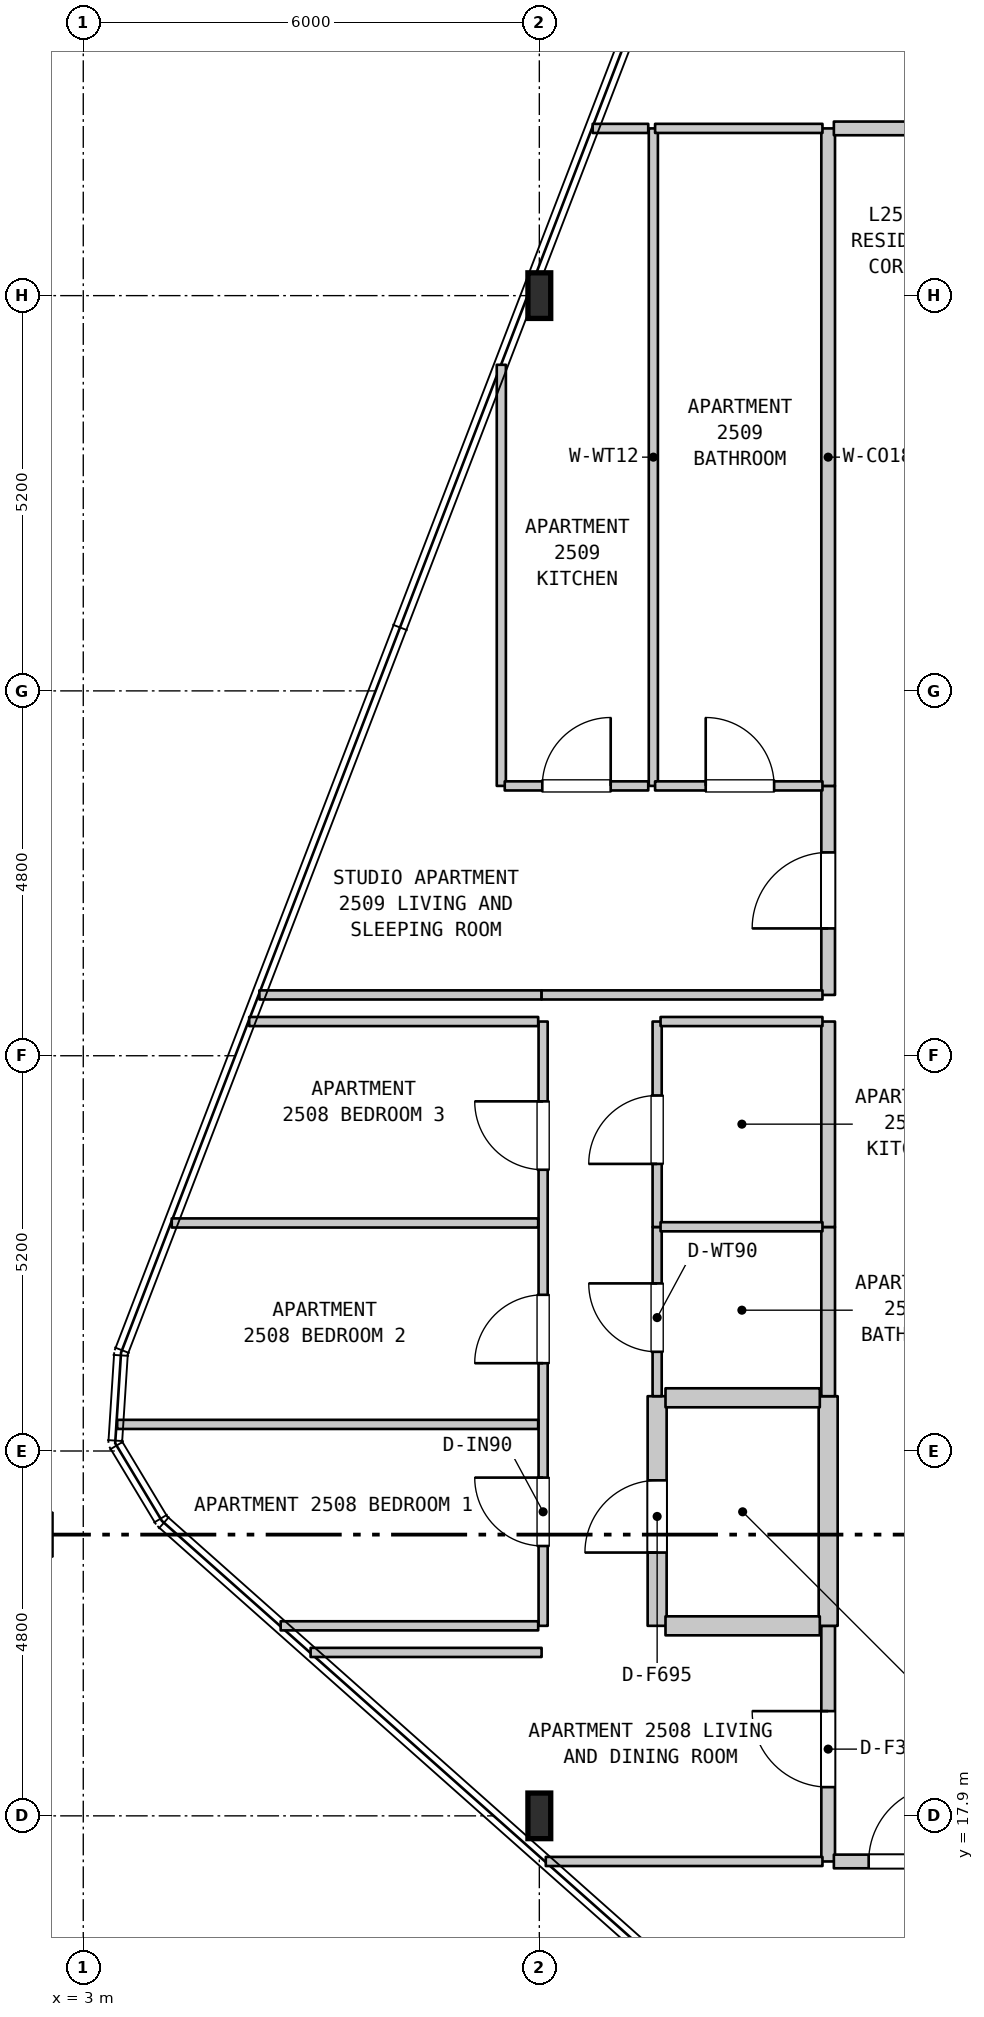
"""IFC4 building model, lengths in metres.
Left out: names, types, materials, properties, quantities, classifications, styles, units other than length and angle.
Written with IfcOpenShell. Run it as: python <this file> out.ifc"""

import sys

from ifc_helpers import new_model, si_unit, direction, frame, frame_2d, origin, origin_2d, place, context, subcontext, project, spatial, rectangle, i_section, extrude, element, fill, save


model = new_model("IFC4")
c1 = context("Model", 3, precision=1e-05, world=origin(), true_north=direction((0.0, 1.0)))
c2 = subcontext(c1, "Body", "Model", "MODEL_VIEW")
j1 = project(units=[si_unit("LENGTHUNIT", "METRE"), si_unit("PLANEANGLEUNIT", "RADIAN")], contexts=[c1])
p1 = place(None, origin())
s1 = spatial("IfcSite", under=j1, at=p1, CompositionType="ELEMENT")
p2 = place(p1, origin())
s2 = spatial("IfcBuilding", under=s1, at=p2, CompositionType="ELEMENT")
p3 = place(p2, frame((0.0, 0.0, 105.7)))
s3 = spatial("IfcBuildingStorey", under=s2, at=p3, CompositionType="ELEMENT", Elevation=105.7)
for number, where, z_axis, x_axis in (
    (1, (9.0, 17.9, 0.0), (0.0, 0.0, 1.0), (1.0, 0.0, 0.0)),
    (2, (9.0, 37.9, 0.0), (0.0, 0.0, 1.0), (1.0, 0.0, 0.0)),
):
    element("IfcColumn", number, at=place(p3, frame(where, z_axis=z_axis, x_axis=x_axis)), inside=s3, PredefinedType="COLUMN", context=c2, shape_type="SweptSolid", body=[
        extrude(i_section(OverallWidth=0.3, OverallDepth=0.6, WebThickness=0.015, FlangeThickness=0.03, FilletRadius=0.027, at=origin_2d()), origin(), (0.0, 0.0, 1.0), 3.7),
    ])
p4 = place(p3, frame((8.5, 31.45, 0.0), z_axis=(0.0, 0.0, 1.0), x_axis=(0.0, 1.0, 0.0)))
e3 = element("IfcWall", 3, at=p4, inside=s3, PredefinedType="PARTITIONING", context=c2, shape_type="SweptSolid", body=[
    extrude(rectangle(XDim=5.54, YDim=0.12, at=frame_2d((2.77, 0.0))), origin(), (0.0, 0.0, 1.0), 3.385),
])
p5 = place(p3, frame((9.05, 20.4, 0.0), z_axis=(0.0, 0.0, 1.0), x_axis=(0.0, 1.0, 0.0)))
e4 = element("IfcWall", 4, at=p5, inside=s3, PredefinedType="PARTITIONING", context=c2, shape_type="SweptSolid", body=[
    extrude(rectangle(XDim=7.95, YDim=0.12, at=frame_2d((3.975, 0.0))), origin(), (0.0, 0.0, 1.0), 2.785),
])
p6 = place(p5, frame((1.05, 0.0, 0.0)))
e5 = element("IfcOpeningElement", 5, at=p6, cuts=e4, PredefinedType="OPENING", context=c2, shape_type="SweptSolid", body=[
    extrude(rectangle(XDim=0.9, YDim=2.15, at=frame_2d((0.45, 1.075))), frame((0.0, 0.07, 0.0), z_axis=(0.0, -1.0, 0.0), x_axis=(1.0, 0.0, 0.0)), (0.0, 0.0, 1.0), 0.14),
])
p7 = place(p5, frame((3.455, 0.0, 0.0)))
e6 = element("IfcOpeningElement", 6, at=p7, cuts=e4, PredefinedType="OPENING", context=c2, shape_type="SweptSolid", body=[
    extrude(rectangle(XDim=0.9, YDim=2.15, at=frame_2d((0.45, 1.075))), frame((0.0, 0.07, 0.0), z_axis=(0.0, -1.0, 0.0), x_axis=(1.0, 0.0, 0.0)), (0.0, 0.0, 1.0), 0.14),
])
p8 = place(p5, frame((6.0, 0.0, 0.0)))
e7 = element("IfcOpeningElement", 7, at=p8, cuts=e4, PredefinedType="OPENING", context=c2, shape_type="SweptSolid", body=[
    extrude(rectangle(XDim=0.9, YDim=2.15, at=frame_2d((0.45, 1.075))), frame((0.0, 0.07, 0.0), z_axis=(0.0, -1.0, 0.0), x_axis=(1.0, 0.0, 0.0)), (0.0, 0.0, 1.0), 0.14),
])
p9 = place(p3, frame((10.5, 31.45, 0.0), z_axis=(0.0, 0.0, 1.0), x_axis=(0.0, 1.0, 0.0)))
e8 = element("IfcWall", 8, at=p9, inside=s3, PredefinedType="PARTITIONING", context=c2, shape_type="SweptSolid", body=[
    extrude(rectangle(XDim=8.65, YDim=0.12, at=frame_2d((4.325, 0.0))), origin(), (0.0, 0.0, 1.0), 3.385),
])
p10 = place(p3, frame((10.55, 20.4, 0.0), z_axis=(0.0, 0.0, 1.0), x_axis=(0.0, 1.0, 0.0)))
e9 = element("IfcWall", 9, at=p10, inside=s3, PredefinedType="STANDARD", context=c2, shape_type="SweptSolid", body=[
    extrude(rectangle(XDim=3.021, YDim=0.25, at=frame_2d((1.51, 0.0))), origin(), (0.0, 0.0, 1.0), 3.385),
])
p11 = place(p10, frame((0.964, 0.0, 0.0)))
e10 = element("IfcOpeningElement", 10, at=p11, cuts=e9, PredefinedType="OPENING", context=c2, shape_type="SweptSolid", body=[
    extrude(rectangle(XDim=0.95, YDim=2.15, at=frame_2d((0.475, 1.075))), frame((0.0, 0.135, 0.0), z_axis=(0.0, -1.0, 0.0), x_axis=(1.0, 0.0, 0.0)), (0.0, 0.0, 1.0), 0.27),
])
p12 = place(p3, frame((10.55, 23.421, 0.0), z_axis=(0.0, 0.0, 1.0), x_axis=(0.0, 1.0, 0.0)))
e11 = element("IfcWall", 11, at=p12, inside=s3, PredefinedType="PARTITIONING", context=c2, shape_type="SweptSolid", body=[
    extrude(rectangle(XDim=2.226, YDim=0.12, at=frame_2d((1.113, 0.0))), origin(), (0.0, 0.0, 1.0), 3.385),
])
p13 = place(p12, frame((0.584, 0.0, 0.0)))
e12 = element("IfcOpeningElement", 12, at=p13, cuts=e11, PredefinedType="OPENING", context=c2, shape_type="SweptSolid", body=[
    extrude(rectangle(XDim=0.9, YDim=2.1, at=frame_2d((0.45, 1.05))), frame((0.0, 0.07, 0.0), z_axis=(0.0, -1.0, 0.0), x_axis=(1.0, 0.0, 0.0)), (0.0, 0.0, 1.0), 0.14),
])
p14 = place(p3, frame((10.55, 25.647, 0.0), z_axis=(0.0, 0.0, 1.0), x_axis=(0.0, 1.0, 0.0)))
e13 = element("IfcWall", 13, at=p14, inside=s3, PredefinedType="PARTITIONING", context=c2, shape_type="SweptSolid", body=[
    extrude(rectangle(XDim=2.703, YDim=0.12, at=frame_2d((1.352, 0.0))), origin(), (0.0, 0.0, 1.0), 3.385),
])
p15 = place(p14, frame((0.83, 0.0, 0.0)))
e14 = element("IfcOpeningElement", 14, at=p15, cuts=e13, PredefinedType="OPENING", context=c2, shape_type="SweptSolid", body=[
    extrude(rectangle(XDim=0.9, YDim=2.15, at=frame_2d((0.45, 1.075))), frame((0.0, 0.07, 0.0), z_axis=(0.0, -1.0, 0.0), x_axis=(1.0, 0.0, 0.0)), (0.0, 0.0, 1.0), 0.14),
])
p16 = place(p3, frame((12.8, 17.3, 0.0), z_axis=(0.0, 0.0, 1.0), x_axis=(0.0, 1.0, 0.0)))
e15 = element("IfcWall", 15, at=p16, inside=s3, PredefinedType="STANDARD", context=c2, shape_type="SweptSolid", body=[
    extrude(rectangle(XDim=3.1, YDim=0.18, at=frame_2d((1.55, 0.0))), origin(), (0.0, 0.0, 1.0), 3.385),
])
p17 = place(p16, frame((0.978, 0.0, 0.0)))
e16 = element("IfcOpeningElement", 16, at=p17, cuts=e15, PredefinedType="OPENING", context=c2, shape_type="SweptSolid", body=[
    extrude(rectangle(XDim=1.0, YDim=2.15, at=frame_2d((0.5, 1.075))), frame((0.0, 0.1, 0.0), z_axis=(0.0, -1.0, 0.0), x_axis=(1.0, 0.0, 0.0)), (0.0, 0.0, 1.0), 0.2),
])
p18 = place(p3, frame((12.8, 20.4, 0.0), z_axis=(0.0, 0.0, 1.0), x_axis=(0.0, 1.0, 0.0)))
e17 = element("IfcWall", 17, at=p18, inside=s3, PredefinedType="STANDARD", context=c2, shape_type="SweptSolid", body=[
    extrude(rectangle(XDim=3.021, YDim=0.25, at=frame_2d((1.51, 0.0))), origin(), (0.0, 0.0, 1.0), 3.385),
])
p19 = place(p3, frame((12.8, 23.421, 0.0), z_axis=(0.0, 0.0, 1.0), x_axis=(0.0, 1.0, 0.0)))
e18 = element("IfcWall", 18, at=p19, inside=s3, PredefinedType="STANDARD", context=c2, shape_type="SweptSolid", body=[
    extrude(rectangle(XDim=2.226, YDim=0.18, at=frame_2d((1.113, 0.0))), origin(), (0.0, 0.0, 1.0), 3.385),
])
p20 = place(p3, frame((12.8, 25.647, 0.0), z_axis=(0.0, 0.0, 1.0), x_axis=(0.0, 1.0, 0.0)))
e19 = element("IfcWall", 19, at=p20, inside=s3, PredefinedType="STANDARD", context=c2, shape_type="SweptSolid", body=[
    extrude(rectangle(XDim=2.703, YDim=0.18, at=frame_2d((1.352, 0.0))), origin(), (0.0, 0.0, 1.0), 3.385),
])
p21 = place(p3, frame((12.8, 28.7, 0.0), z_axis=(0.0, 0.0, 1.0), x_axis=(0.0, 1.0, 0.0)))
e20 = element("IfcWall", 20, at=p21, inside=s3, PredefinedType="STANDARD", context=c2, shape_type="SweptSolid", body=[
    extrude(rectangle(XDim=2.75, YDim=0.18, at=frame_2d((1.375, 0.0))), origin(), (0.0, 0.0, 1.0), 3.385),
])
p22 = place(p21, frame((0.875, 0.0, 0.0)))
e21 = element("IfcOpeningElement", 21, at=p22, cuts=e20, PredefinedType="OPENING", context=c2, shape_type="SweptSolid", body=[
    extrude(rectangle(XDim=1.0, YDim=2.15, at=frame_2d((0.5, 1.075))), frame((0.0, 0.1, 0.0), z_axis=(0.0, -1.0, 0.0), x_axis=(1.0, 0.0, 0.0)), (0.0, 0.0, 1.0), 0.2),
])
p23 = place(p3, frame((12.8, 31.45, 0.0), z_axis=(0.0, 0.0, 1.0), x_axis=(0.0, 1.0, 0.0)))
e22 = element("IfcWall", 22, at=p23, inside=s3, PredefinedType="STANDARD", context=c2, shape_type="SweptSolid", body=[
    extrude(rectangle(XDim=8.65, YDim=0.18, at=frame_2d((4.325, 0.0))), origin(), (0.0, 0.0, 1.0), 3.385),
])
p24 = place(p3, frame((9.085, 17.3, 0.0), z_axis=(0.0, 0.0, 1.0), x_axis=(1.0, 0.0, 0.0)))
e23 = element("IfcWall", 23, at=p24, inside=s3, PredefinedType="PARTITIONING", context=c2, shape_type="SweptSolid", body=[
    extrude(rectangle(XDim=3.64, YDim=0.12, at=frame_2d((1.82, 0.0))), origin(), (0.0, 0.0, 1.0), 3.385),
])
p25 = place(p3, frame((12.875, 17.3, 0.0), z_axis=(0.0, 0.0, 1.0), x_axis=(1.0, 0.0, 0.0)))
e24 = element("IfcWall", 24, at=p25, inside=s3, PredefinedType="STANDARD", context=c2, shape_type="SweptSolid", body=[
    extrude(rectangle(XDim=3.78, YDim=0.18, at=frame_2d((1.89, 0.0))), origin(), (0.0, 0.0, 1.0), 3.385),
])
p26 = place(p25, frame((0.458, 0.0, 0.0)))
e25 = element("IfcOpeningElement", 25, at=p26, cuts=e24, PredefinedType="OPENING", context=c2, shape_type="SweptSolid", body=[
    extrude(rectangle(XDim=1.0, YDim=2.15, at=frame_2d((0.5, 1.075))), frame((0.0, 0.1, 0.0), z_axis=(0.0, -1.0, 0.0), x_axis=(1.0, 0.0, 0.0)), (0.0, 0.0, 1.0), 0.2),
])
p27 = place(p3, frame((5.991, 20.05, 0.0), z_axis=(0.0, 0.0, 1.0), x_axis=(1.0, 0.0, 0.0)))
e26 = element("IfcWall", 26, at=p27, inside=s3, PredefinedType="PARTITIONING", context=c2, shape_type="SweptSolid", body=[
    extrude(rectangle(XDim=3.039, YDim=0.12, at=frame_2d((1.52, 0.0))), origin(), (0.0, 0.0, 1.0), 3.385),
])
p28 = place(p3, frame((5.597, 20.4, 0.0), z_axis=(0.0, 0.0, 1.0), x_axis=(1.0, 0.0, 0.0)))
e27 = element("IfcWall", 27, at=p28, inside=s3, PredefinedType="PARTITIONING", context=c2, shape_type="SweptSolid", body=[
    extrude(rectangle(XDim=3.388, YDim=0.12, at=frame_2d((1.694, 0.0))), origin(), (0.0, 0.0, 1.0), 3.385),
])
p29 = place(p3, frame((10.66, 20.4, 0.0), z_axis=(0.0, 0.0, 1.0), x_axis=(1.0, 0.0, 0.0)))
e28 = element("IfcWall", 28, at=p29, inside=s3, PredefinedType="STANDARD", context=c2, shape_type="SweptSolid", body=[
    extrude(rectangle(XDim=2.03, YDim=0.25, at=frame_2d((1.015, 0.0))), origin(), (0.0, 0.0, 1.0), 3.385),
])
p30 = place(p3, frame((3.446, 23.05, 0.0), z_axis=(0.0, 0.0, 1.0), x_axis=(1.0, 0.0, 0.0)))
e29 = element("IfcWall", 29, at=p30, inside=s3, PredefinedType="PARTITIONING", context=c2, shape_type="SweptSolid", body=[
    extrude(rectangle(XDim=5.539, YDim=0.12, at=frame_2d((2.77, 0.0))), origin(), (0.0, 0.0, 1.0), 3.385),
])
p31 = place(p3, frame((10.66, 23.4, 0.0), z_axis=(0.0, 0.0, 1.0), x_axis=(1.0, 0.0, 0.0)))
e30 = element("IfcWall", 30, at=p31, inside=s3, PredefinedType="STANDARD", context=c2, shape_type="SweptSolid", body=[
    extrude(rectangle(XDim=2.03, YDim=0.25, at=frame_2d((1.015, 0.0))), origin(), (0.0, 0.0, 1.0), 3.385),
])
p32 = place(p3, frame((10.595, 25.65, 0.0), z_axis=(0.0, 0.0, 1.0), x_axis=(1.0, 0.0, 0.0)))
e31 = element("IfcWall", 31, at=p32, inside=s3, PredefinedType="PARTITIONING", context=c2, shape_type="SweptSolid", body=[
    extrude(rectangle(XDim=2.13, YDim=0.12, at=frame_2d((1.065, 0.0))), origin(), (0.0, 0.0, 1.0), 3.385),
])
p33 = place(p3, frame((4.164, 25.7, 0.0), z_axis=(0.0, 0.0, 1.0), x_axis=(1.0, 0.0, 0.0)))
e32 = element("IfcWall", 32, at=p33, inside=s3, PredefinedType="PARTITIONING", context=c2, shape_type="SweptSolid", body=[
    extrude(rectangle(XDim=4.821, YDim=0.12, at=frame_2d((2.411, 0.0))), origin(), (0.0, 0.0, 1.0), 3.385),
])
p34 = place(p3, frame((5.183, 28.35, 0.0), z_axis=(0.0, 0.0, 1.0), x_axis=(1.0, 0.0, 0.0)))
e33 = element("IfcWall", 33, at=p34, inside=s3, PredefinedType="PARTITIONING", context=c2, shape_type="SweptSolid", body=[
    extrude(rectangle(XDim=3.802, YDim=0.12, at=frame_2d((1.901, 0.0))), origin(), (0.0, 0.0, 1.0), 3.385),
])
p35 = place(p3, frame((10.595, 28.35, 0.0), z_axis=(0.0, 0.0, 1.0), x_axis=(1.0, 0.0, 0.0)))
e34 = element("IfcWall", 34, at=p35, inside=s3, PredefinedType="PARTITIONING", context=c2, shape_type="SweptSolid", body=[
    extrude(rectangle(XDim=2.13, YDim=0.12, at=frame_2d((1.065, 0.0))), origin(), (0.0, 0.0, 1.0), 3.385),
])
p36 = place(p3, frame((5.317, 28.7, 0.0), z_axis=(0.0, 0.0, 1.0), x_axis=(1.0, 0.0, 0.0)))
e35 = element("IfcWall", 35, at=p36, inside=s3, PredefinedType="PARTITIONING", context=c2, shape_type="SweptSolid", body=[
    extrude(rectangle(XDim=3.713, YDim=0.12, at=frame_2d((1.856, 0.0))), origin(), (0.0, 0.0, 1.0), 3.385),
])
p37 = place(p3, frame((9.03, 28.7, 0.0), z_axis=(0.0, 0.0, 1.0), x_axis=(1.0, 0.0, 0.0)))
e36 = element("IfcWall", 36, at=p37, inside=s3, PredefinedType="PARTITIONING", context=c2, shape_type="SweptSolid", body=[
    extrude(rectangle(XDim=3.695, YDim=0.12, at=frame_2d((1.848, 0.0))), origin(), (0.0, 0.0, 1.0), 3.385),
])
p38 = place(p3, frame((8.545, 31.45, 0.0), z_axis=(0.0, 0.0, 1.0), x_axis=(1.0, 0.0, 0.0)))
e37 = element("IfcWall", 37, at=p38, inside=s3, PredefinedType="PARTITIONING", context=c2, shape_type="SweptSolid", body=[
    extrude(rectangle(XDim=1.888, YDim=0.12, at=frame_2d((0.944, 0.0))), origin(), (0.0, 0.0, 1.0), 3.385),
])
p39 = place(p38, frame((0.494, 0.0, 0.0)))
e38 = element("IfcOpeningElement", 38, at=p39, cuts=e37, PredefinedType="OPENING", context=c2, shape_type="SweptSolid", body=[
    extrude(rectangle(XDim=0.9, YDim=2.15, at=frame_2d((0.45, 1.075))), frame((0.0, 0.07, 0.0), z_axis=(0.0, -1.0, 0.0), x_axis=(1.0, 0.0, 0.0)), (0.0, 0.0, 1.0), 0.14),
])
p40 = place(p3, frame((10.523, 31.45, 0.0), z_axis=(0.0, 0.0, 1.0), x_axis=(1.0, 0.0, 0.0)))
e39 = element("IfcWall", 39, at=p40, inside=s3, PredefinedType="PARTITIONING", context=c2, shape_type="SweptSolid", body=[
    extrude(rectangle(XDim=2.202, YDim=0.12, at=frame_2d((1.101, 0.0))), origin(), (0.0, 0.0, 1.0), 3.385),
])
p41 = place(p40, frame((0.666, 0.0, 0.0)))
e40 = element("IfcOpeningElement", 40, at=p41, cuts=e39, PredefinedType="OPENING", context=c2, shape_type="SweptSolid", body=[
    extrude(rectangle(XDim=0.9, YDim=2.1, at=frame_2d((0.45, 1.05))), frame((0.0, 0.07, 0.0), z_axis=(0.0, -1.0, 0.0), x_axis=(1.0, 0.0, 0.0)), (0.0, 0.0, 1.0), 0.14),
])
p42 = place(p3, frame((9.702, 40.1, 0.0), z_axis=(0.0, 0.0, 1.0), x_axis=(1.0, 0.0, 0.0)))
e41 = element("IfcWall", 41, at=p42, inside=s3, PredefinedType="PARTITIONING", context=c2, shape_type="SweptSolid", body=[
    extrude(rectangle(XDim=0.731, YDim=0.12, at=frame_2d((0.366, 0.0))), origin(), (0.0, 0.0, 1.0), 3.385),
])
p43 = place(p3, frame((10.523, 40.1, 0.0), z_axis=(0.0, 0.0, 1.0), x_axis=(1.0, 0.0, 0.0)))
e42 = element("IfcWall", 42, at=p43, inside=s3, PredefinedType="PARTITIONING", context=c2, shape_type="SweptSolid", body=[
    extrude(rectangle(XDim=2.202, YDim=0.12, at=frame_2d((1.101, 0.0))), origin(), (0.0, 0.0, 1.0), 3.385),
])
p44 = place(p3, frame((12.875, 40.1, 0.0), z_axis=(0.0, 0.0, 1.0), x_axis=(1.0, 0.0, 0.0)))
e43 = element("IfcWall", 43, at=p44, inside=s3, PredefinedType="STANDARD", context=c2, shape_type="SweptSolid", body=[
    extrude(rectangle(XDim=5.03, YDim=0.18, at=frame_2d((2.515, 0.0))), origin(), (0.0, 0.0, 1.0), 3.385),
])
p45 = place(p44, frame((2.0, 0.0, 0.0)))
e44 = element("IfcOpeningElement", 44, at=p45, cuts=e43, PredefinedType="OPENING", context=c2, shape_type="SweptSolid", body=[
    extrude(rectangle(XDim=1.0, YDim=2.15, at=frame_2d((0.5, 1.075))), frame((0.0, 0.1, 0.0), z_axis=(0.0, -1.0, 0.0), x_axis=(1.0, 0.0, 0.0)), (0.0, 0.0, 1.0), 0.2),
])
p46 = place(p6, origin())
e45 = element("IfcDoor", 45, at=p46, inside=s3, OperationType="SINGLE_SWING_RIGHT", PredefinedType="DOOR", context=c2, shape_type="SweptSolid", body=[
    extrude(rectangle(XDim=0.9, YDim=2.15, at=frame_2d((0.45, 1.075))), frame((0.0, 0.025, 0.0), z_axis=(0.0, -1.0, 0.0), x_axis=(1.0, 0.0, 0.0)), (0.0, 0.0, 1.0), 0.05),
])
fill(e5, e45)
p47 = place(p7, origin())
e46 = element("IfcDoor", 46, at=p47, inside=s3, OperationType="SINGLE_SWING_LEFT", PredefinedType="DOOR", context=c2, shape_type="SweptSolid", body=[
    extrude(rectangle(XDim=0.9, YDim=2.15, at=frame_2d((0.45, 1.075))), frame((0.0, 0.025, 0.0), z_axis=(0.0, -1.0, 0.0), x_axis=(1.0, 0.0, 0.0)), (0.0, 0.0, 1.0), 0.05),
])
fill(e6, e46)
p48 = place(p8, origin())
e47 = element("IfcDoor", 47, at=p48, inside=s3, OperationType="SINGLE_SWING_RIGHT", PredefinedType="DOOR", context=c2, shape_type="SweptSolid", body=[
    extrude(rectangle(XDim=0.9, YDim=2.15, at=frame_2d((0.45, 1.075))), frame((0.0, 0.025, 0.0), z_axis=(0.0, -1.0, 0.0), x_axis=(1.0, 0.0, 0.0)), (0.0, 0.0, 1.0), 0.05),
])
fill(e7, e47)
p49 = place(p11, origin())
e48 = element("IfcDoor", 48, at=p49, inside=s3, OperationType="SINGLE_SWING_LEFT", PredefinedType="DOOR", context=c2, shape_type="SweptSolid", body=[
    extrude(rectangle(XDim=0.95, YDim=2.15, at=frame_2d((0.475, 1.075))), frame((0.0, 0.025, 0.0), z_axis=(0.0, -1.0, 0.0), x_axis=(1.0, 0.0, 0.0)), (0.0, 0.0, 1.0), 0.05),
])
fill(e10, e48)
p50 = place(p13, origin())
e49 = element("IfcDoor", 49, at=p50, inside=s3, OperationType="SINGLE_SWING_RIGHT", PredefinedType="DOOR", context=c2, shape_type="SweptSolid", body=[
    extrude(rectangle(XDim=0.9, YDim=2.1, at=frame_2d((0.45, 1.05))), frame((0.0, 0.025, 0.0), z_axis=(0.0, -1.0, 0.0), x_axis=(1.0, 0.0, 0.0)), (0.0, 0.0, 1.0), 0.05),
])
fill(e12, e49)
p51 = place(p15, origin())
e50 = element("IfcDoor", 50, at=p51, inside=s3, OperationType="SINGLE_SWING_LEFT", PredefinedType="DOOR", context=c2, shape_type="SweptSolid", body=[
    extrude(rectangle(XDim=0.9, YDim=2.15, at=frame_2d((0.45, 1.075))), frame((0.0, 0.025, 0.0), z_axis=(0.0, -1.0, 0.0), x_axis=(1.0, 0.0, 0.0)), (0.0, 0.0, 1.0), 0.05),
])
fill(e14, e50)
p52 = place(p17, origin())
e51 = element("IfcDoor", 51, at=p52, inside=s3, OperationType="SINGLE_SWING_RIGHT", PredefinedType="DOOR", context=c2, shape_type="SweptSolid", body=[
    extrude(rectangle(XDim=1.0, YDim=2.15, at=frame_2d((0.5, 1.075))), frame((0.0, 0.025, 0.0), z_axis=(0.0, -1.0, 0.0), x_axis=(1.0, 0.0, 0.0)), (0.0, 0.0, 1.0), 0.05),
])
fill(e16, e51)
p53 = place(p22, origin())
e52 = element("IfcDoor", 52, at=p53, inside=s3, OperationType="SINGLE_SWING_LEFT", PredefinedType="DOOR", context=c2, shape_type="SweptSolid", body=[
    extrude(rectangle(XDim=1.0, YDim=2.15, at=frame_2d((0.5, 1.075))), frame((0.0, 0.025, 0.0), z_axis=(0.0, -1.0, 0.0), x_axis=(1.0, 0.0, 0.0)), (0.0, 0.0, 1.0), 0.05),
])
fill(e21, e52)
p54 = place(p26, origin())
e53 = element("IfcDoor", 53, at=p54, inside=s3, OperationType="SINGLE_SWING_RIGHT", PredefinedType="DOOR", context=c2, shape_type="SweptSolid", body=[
    extrude(rectangle(XDim=1.0, YDim=2.15, at=frame_2d((0.5, 1.075))), frame((0.0, 0.025, 0.0), z_axis=(0.0, -1.0, 0.0), x_axis=(1.0, 0.0, 0.0)), (0.0, 0.0, 1.0), 0.05),
])
fill(e25, e53)
p55 = place(p39, origin())
e54 = element("IfcDoor", 54, at=p55, inside=s3, OperationType="SINGLE_SWING_RIGHT", PredefinedType="DOOR", context=c2, shape_type="SweptSolid", body=[
    extrude(rectangle(XDim=0.9, YDim=2.15, at=frame_2d((0.45, 1.075))), frame((0.0, 0.025, 0.0), z_axis=(0.0, -1.0, 0.0), x_axis=(1.0, 0.0, 0.0)), (0.0, 0.0, 1.0), 0.05),
])
fill(e38, e54)
p56 = place(p41, origin())
e55 = element("IfcDoor", 55, at=p56, inside=s3, OperationType="SINGLE_SWING_LEFT", PredefinedType="DOOR", context=c2, shape_type="SweptSolid", body=[
    extrude(rectangle(XDim=0.9, YDim=2.1, at=frame_2d((0.45, 1.05))), frame((0.0, 0.025, 0.0), z_axis=(0.0, -1.0, 0.0), x_axis=(1.0, 0.0, 0.0)), (0.0, 0.0, 1.0), 0.05),
])
fill(e40, e55)
save(model, sys.argv[1])
